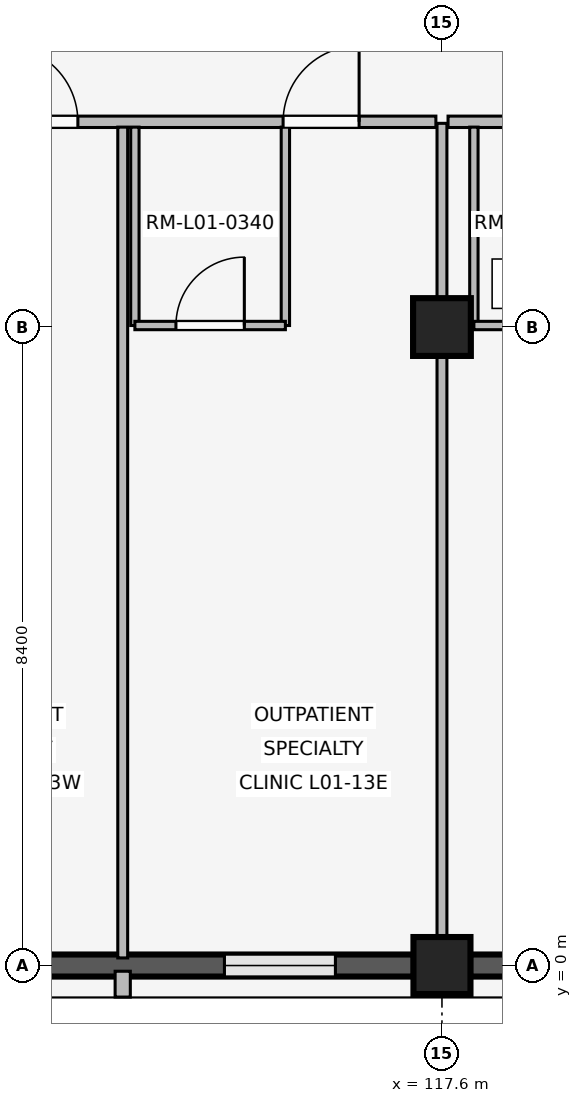
"""IFC4 building model, lengths in metres.
Left out: names, types, materials, properties, quantities, classifications, styles, units other than length and angle.
Written with IfcOpenShell. Run it as: python <this file> out.ifc"""

import sys

from ifc_helpers import new_model, si_unit, direction, frame, frame_2d, origin, origin_2d, place, context, subcontext, project, spatial, rectangle, extrude, element, fill, save


model = new_model("IFC4")
c1 = context("Model", 3, precision=1e-05, world=origin(), true_north=direction((0.0, 1.0)))
c2 = subcontext(c1, "Body", "Model", "MODEL_VIEW")
j1 = project(units=[si_unit("LENGTHUNIT", "METRE"), si_unit("PLANEANGLEUNIT", "RADIAN")], contexts=[c1])
p1 = place(None, origin())
s1 = spatial("IfcSite", under=j1, at=p1, CompositionType="ELEMENT")
p2 = place(p1, origin())
s2 = spatial("IfcBuilding", under=s1, at=p2, CompositionType="ELEMENT")
p3 = place(p2, frame((0.0, 0.0, 4.8)))
s3 = spatial("IfcBuildingStorey", under=s2, at=p3, CompositionType="ELEMENT", Elevation=4.8)
p4 = place(p3, frame((117.6, 0.0, 0.0), z_axis=(0.0, 0.0, 1.0), x_axis=(1.0, 0.0, 0.0)))
e1 = element("IfcColumn", 1, at=p4, inside=s3, PredefinedType="COLUMN", context=c2, shape_type="SweptSolid", body=[
    extrude(rectangle(XDim=0.75, YDim=0.75, at=origin_2d()), origin(), (0.0, 0.0, 1.0), 3.3),
])
p5 = place(p3, frame((117.6, 8.4, 0.0), z_axis=(0.0, 0.0, 1.0), x_axis=(1.0, 0.0, 0.0)))
e2 = element("IfcColumn", 2, at=p5, inside=s3, PredefinedType="COLUMN", context=c2, shape_type="SweptSolid", body=[
    extrude(rectangle(XDim=0.76, YDim=0.76, at=origin_2d()), origin(), (0.0, 0.0, 1.0), 3.3),
])
p6 = place(p3, frame((117.23, 0.0, 0.0), z_axis=(0.0, 0.0, 1.0), x_axis=(-1.0, 0.0, 0.0)))
e3 = element("IfcWall", 3, at=p6, inside=s3, PredefinedType="SOLIDWALL", context=c2, shape_type="SweptSolid", body=[
    extrude(rectangle(XDim=7.66, YDim=0.29, at=frame_2d((3.83, 0.0))), origin(), (0.0, 0.0, 1.0), 2.42),
])
p7 = place(p6, frame((1.032, 0.0, 0.85)))
e4 = element("IfcOpeningElement", 4, at=p7, cuts=e3, PredefinedType="OPENING", context=c2, shape_type="SweptSolid", body=[
    extrude(rectangle(XDim=1.46, YDim=0.85, at=frame_2d((0.73, 0.425))), frame((0.0, 0.155, 0.0), z_axis=(0.0, -1.0, 0.0), x_axis=(1.0, 0.0, 0.0)), (0.0, 0.0, 1.0), 0.31),
])
p8 = place(p6, frame((5.168, 0.0, 0.85)))
e5 = element("IfcOpeningElement", 5, at=p8, cuts=e3, PredefinedType="OPENING", context=c2, shape_type="SweptSolid", body=[
    extrude(rectangle(XDim=1.46, YDim=0.85, at=frame_2d((0.73, 0.425))), frame((0.0, 0.155, 0.0), z_axis=(0.0, -1.0, 0.0), x_axis=(1.0, 0.0, 0.0)), (0.0, 0.0, 1.0), 0.31),
])
p9 = place(p3, frame((113.4, -0.075, 0.0), z_axis=(0.0, 0.0, 1.0), x_axis=(0.0, -1.0, 0.0)))
e6 = element("IfcWall", 6, at=p9, inside=s3, PredefinedType="ELEMENTEDWALL", context=c2, shape_type="SweptSolid", body=[
    extrude(rectangle(XDim=0.34, YDim=0.2, at=frame_2d((0.17, 0.0))), origin(), (0.0, 0.0, 1.0), 2.4),
])
p10 = place(p3, frame((125.63, 0.0, 0.0), z_axis=(0.0, 0.0, 1.0), x_axis=(-1.0, 0.0, 0.0)))
e7 = element("IfcWall", 7, at=p10, inside=s3, PredefinedType="SOLIDWALL", context=c2, shape_type="SweptSolid", body=[
    extrude(rectangle(XDim=7.66, YDim=0.29, at=frame_2d((3.83, 0.0))), origin(), (0.0, 0.0, 1.0), 2.42),
])
p11 = place(p10, frame((0.952, 0.0, 0.85)))
e8 = element("IfcOpeningElement", 8, at=p11, cuts=e7, PredefinedType="OPENING", context=c2, shape_type="SweptSolid", body=[
    extrude(rectangle(XDim=1.62, YDim=0.95, at=frame_2d((0.81, 0.475))), frame((0.0, 0.155, 0.0), z_axis=(0.0, -1.0, 0.0), x_axis=(1.0, 0.0, 0.0)), (0.0, 0.0, 1.0), 0.31),
])
p12 = place(p10, frame((5.088, 0.0, 0.85)))
e9 = element("IfcOpeningElement", 9, at=p12, cuts=e7, PredefinedType="OPENING", context=c2, shape_type="SweptSolid", body=[
    extrude(rectangle(XDim=1.62, YDim=0.95, at=frame_2d((0.81, 0.475))), frame((0.0, 0.155, 0.0), z_axis=(0.0, -1.0, 0.0), x_axis=(1.0, 0.0, 0.0)), (0.0, 0.0, 1.0), 0.31),
])
p13 = place(p3, frame((109.28, 11.1, 0.0), z_axis=(0.0, 0.0, 1.0), x_axis=(1.0, 0.0, 0.0)))
e10 = element("IfcWall", 10, at=p13, inside=s3, PredefinedType="PARTITIONING", context=c2, shape_type="SweptSolid", body=[
    extrude(rectangle(XDim=8.24, YDim=0.15, at=frame_2d((4.12, 0.0))), origin(), (0.0, 0.0, 1.0), 2.4),
])
p14 = place(p13, frame((2.53, 0.0, 0.0)))
e11 = element("IfcOpeningElement", 11, at=p14, cuts=e10, PredefinedType="OPENING", context=c2, shape_type="SweptSolid", body=[
    extrude(rectangle(XDim=1.0, YDim=2.15, at=frame_2d((0.5, 1.075))), frame((0.0, 0.085, 0.0), z_axis=(0.0, -1.0, 0.0), x_axis=(1.0, 0.0, 0.0)), (0.0, 0.0, 1.0), 0.17),
])
p15 = place(p13, frame((6.23, 0.0, 0.0)))
e12 = element("IfcOpeningElement", 12, at=p15, cuts=e10, PredefinedType="OPENING", context=c2, shape_type="SweptSolid", body=[
    extrude(rectangle(XDim=1.0, YDim=2.15, at=frame_2d((0.5, 1.075))), frame((0.0, 0.085, 0.0), z_axis=(0.0, -1.0, 0.0), x_axis=(1.0, 0.0, 0.0)), (0.0, 0.0, 1.0), 0.17),
])
p16 = place(p3, frame((113.4, 0.1, 0.0), z_axis=(0.0, 0.0, 1.0), x_axis=(0.0, 1.0, 0.0)))
e13 = element("IfcWall", 13, at=p16, inside=s3, PredefinedType="PARTITIONING", context=c2, shape_type="SweptSolid", body=[
    extrude(rectangle(XDim=10.93, YDim=0.13, at=frame_2d((5.465, 0.0))), origin(), (0.0, 0.0, 1.0), 2.4),
])
for number, where, z_axis, x_axis in (
    (14, (113.56, 8.42, 0.0), (0.0, 0.0, 1.0), (0.0, 1.0, 0.0)),
    (15, (115.54, 8.42, 0.0), (0.0, 0.0, 1.0), (0.0, 1.0, 0.0)),
):
    element("IfcWall", number, at=place(p3, frame(where, z_axis=z_axis, x_axis=x_axis)), inside=s3, PredefinedType="PARTITIONING", context=c2, shape_type="SweptSolid", body=[
        extrude(rectangle(XDim=2.61, YDim=0.11, at=frame_2d((1.305, 0.0))), origin(), (0.0, 0.0, 1.0), 2.4),
    ])
p17 = place(p3, frame((113.56, 8.42, 0.0), z_axis=(0.0, 0.0, 1.0), x_axis=(1.0, 0.0, 0.0)))
e16 = element("IfcWall", 16, at=p17, inside=s3, PredefinedType="PARTITIONING", context=c2, shape_type="SweptSolid", body=[
    extrude(rectangle(XDim=1.98, YDim=0.11, at=frame_2d((0.99, 0.0))), origin(), (0.0, 0.0, 1.0), 2.4),
])
p18 = place(p17, frame((0.54, 0.0, 0.0)))
e17 = element("IfcOpeningElement", 17, at=p18, cuts=e16, PredefinedType="OPENING", context=c2, shape_type="SweptSolid", body=[
    extrude(rectangle(XDim=0.9, YDim=2.1, at=frame_2d((0.45, 1.05))), frame((0.0, 0.065, 0.0), z_axis=(0.0, -1.0, 0.0), x_axis=(1.0, 0.0, 0.0)), (0.0, 0.0, 1.0), 0.13),
])
p19 = place(p3, frame((117.6, 0.14, 0.0), z_axis=(0.0, 0.0, 1.0), x_axis=(0.0, 1.0, 0.0)))
e18 = element("IfcWall", 18, at=p19, inside=s3, PredefinedType="PARTITIONING", context=c2, shape_type="SweptSolid", body=[
    extrude(rectangle(XDim=10.94, YDim=0.13, at=frame_2d((5.47, 0.0))), origin(), (0.0, 0.0, 1.0), 2.4),
])
p20 = place(p3, frame((117.68, 11.1, 0.0), z_axis=(0.0, 0.0, 1.0), x_axis=(1.0, 0.0, 0.0)))
e19 = element("IfcWall", 19, at=p20, inside=s3, PredefinedType="PARTITIONING", context=c2, shape_type="SweptSolid", body=[
    extrude(rectangle(XDim=8.24, YDim=0.15, at=frame_2d((4.12, 0.0))), origin(), (0.0, 0.0, 1.0), 2.4),
])
p21 = place(p20, frame((2.53, 0.0, 0.0)))
e20 = element("IfcOpeningElement", 20, at=p21, cuts=e19, PredefinedType="OPENING", context=c2, shape_type="SweptSolid", body=[
    extrude(rectangle(XDim=1.0, YDim=2.15, at=frame_2d((0.5, 1.075))), frame((0.0, 0.085, 0.0), z_axis=(0.0, -1.0, 0.0), x_axis=(1.0, 0.0, 0.0)), (0.0, 0.0, 1.0), 0.17),
])
p22 = place(p20, frame((6.23, 0.0, 0.0)))
e21 = element("IfcOpeningElement", 21, at=p22, cuts=e19, PredefinedType="OPENING", context=c2, shape_type="SweptSolid", body=[
    extrude(rectangle(XDim=1.0, YDim=2.15, at=frame_2d((0.5, 1.075))), frame((0.0, 0.085, 0.0), z_axis=(0.0, -1.0, 0.0), x_axis=(1.0, 0.0, 0.0)), (0.0, 0.0, 1.0), 0.17),
])
p23 = place(p3, frame((118.02, 8.42, 0.0), z_axis=(0.0, 0.0, 1.0), x_axis=(0.0, 1.0, 0.0)))
e22 = element("IfcWall", 22, at=p23, inside=s3, PredefinedType="PARTITIONING", context=c2, shape_type="SweptSolid", body=[
    extrude(rectangle(XDim=2.61, YDim=0.11, at=frame_2d((1.305, 0.0))), origin(), (0.0, 0.0, 1.0), 2.4),
])
p24 = place(p3, frame((118.02, 8.42, 0.0), z_axis=(0.0, 0.0, 1.0), x_axis=(1.0, 0.0, 0.0)))
e23 = element("IfcWall", 23, at=p24, inside=s3, PredefinedType="PARTITIONING", context=c2, shape_type="SweptSolid", body=[
    extrude(rectangle(XDim=1.98, YDim=0.11, at=frame_2d((0.99, 0.0))), origin(), (0.0, 0.0, 1.0), 2.4),
])
p25 = place(p24, frame((0.54, 0.0, 0.0)))
e24 = element("IfcOpeningElement", 24, at=p25, cuts=e23, PredefinedType="OPENING", context=c2, shape_type="SweptSolid", body=[
    extrude(rectangle(XDim=0.9, YDim=2.1, at=frame_2d((0.45, 1.05))), frame((0.0, 0.065, 0.0), z_axis=(0.0, -1.0, 0.0), x_axis=(1.0, 0.0, 0.0)), (0.0, 0.0, 1.0), 0.13),
])
p26 = place(p7, origin())
e25 = element("IfcWindow", 25, at=p26, inside=s3, PartitioningType="SINGLE_PANEL", PredefinedType="WINDOW", context=c2, shape_type="SweptSolid", body=[
    extrude(rectangle(XDim=1.46, YDim=0.85, at=frame_2d((0.73, 0.425))), frame((0.0, 0.03, 0.0), z_axis=(0.0, -1.0, 0.0), x_axis=(1.0, 0.0, 0.0)), (0.0, 0.0, 1.0), 0.06),
])
fill(e4, e25)
p27 = place(p14, origin())
e26 = element("IfcDoor", 26, at=p27, inside=s3, OperationType="SINGLE_SWING_LEFT", PredefinedType="DOOR", context=c2, shape_type="SweptSolid", body=[
    extrude(rectangle(XDim=1.0, YDim=2.15, at=frame_2d((0.5, 1.075))), frame((0.0, 0.025, 0.0), z_axis=(0.0, -1.0, 0.0), x_axis=(1.0, 0.0, 0.0)), (0.0, 0.0, 1.0), 0.05),
])
fill(e11, e26)
p28 = place(p15, origin())
e27 = element("IfcDoor", 27, at=p28, inside=s3, OperationType="SINGLE_SWING_RIGHT", PredefinedType="DOOR", context=c2, shape_type="SweptSolid", body=[
    extrude(rectangle(XDim=1.0, YDim=2.15, at=frame_2d((0.5, 1.075))), frame((0.0, 0.025, 0.0), z_axis=(0.0, -1.0, 0.0), x_axis=(1.0, 0.0, 0.0)), (0.0, 0.0, 1.0), 0.05),
])
fill(e12, e27)
p29 = place(p18, origin())
e28 = element("IfcDoor", 28, at=p29, inside=s3, OperationType="SINGLE_SWING_RIGHT", PredefinedType="DOOR", context=c2, shape_type="SweptSolid", body=[
    extrude(rectangle(XDim=0.9, YDim=2.1, at=frame_2d((0.45, 1.05))), frame((0.0, 0.025, 0.0), z_axis=(0.0, -1.0, 0.0), x_axis=(1.0, 0.0, 0.0)), (0.0, 0.0, 1.0), 0.05),
])
fill(e17, e28)
save(model, sys.argv[1])
